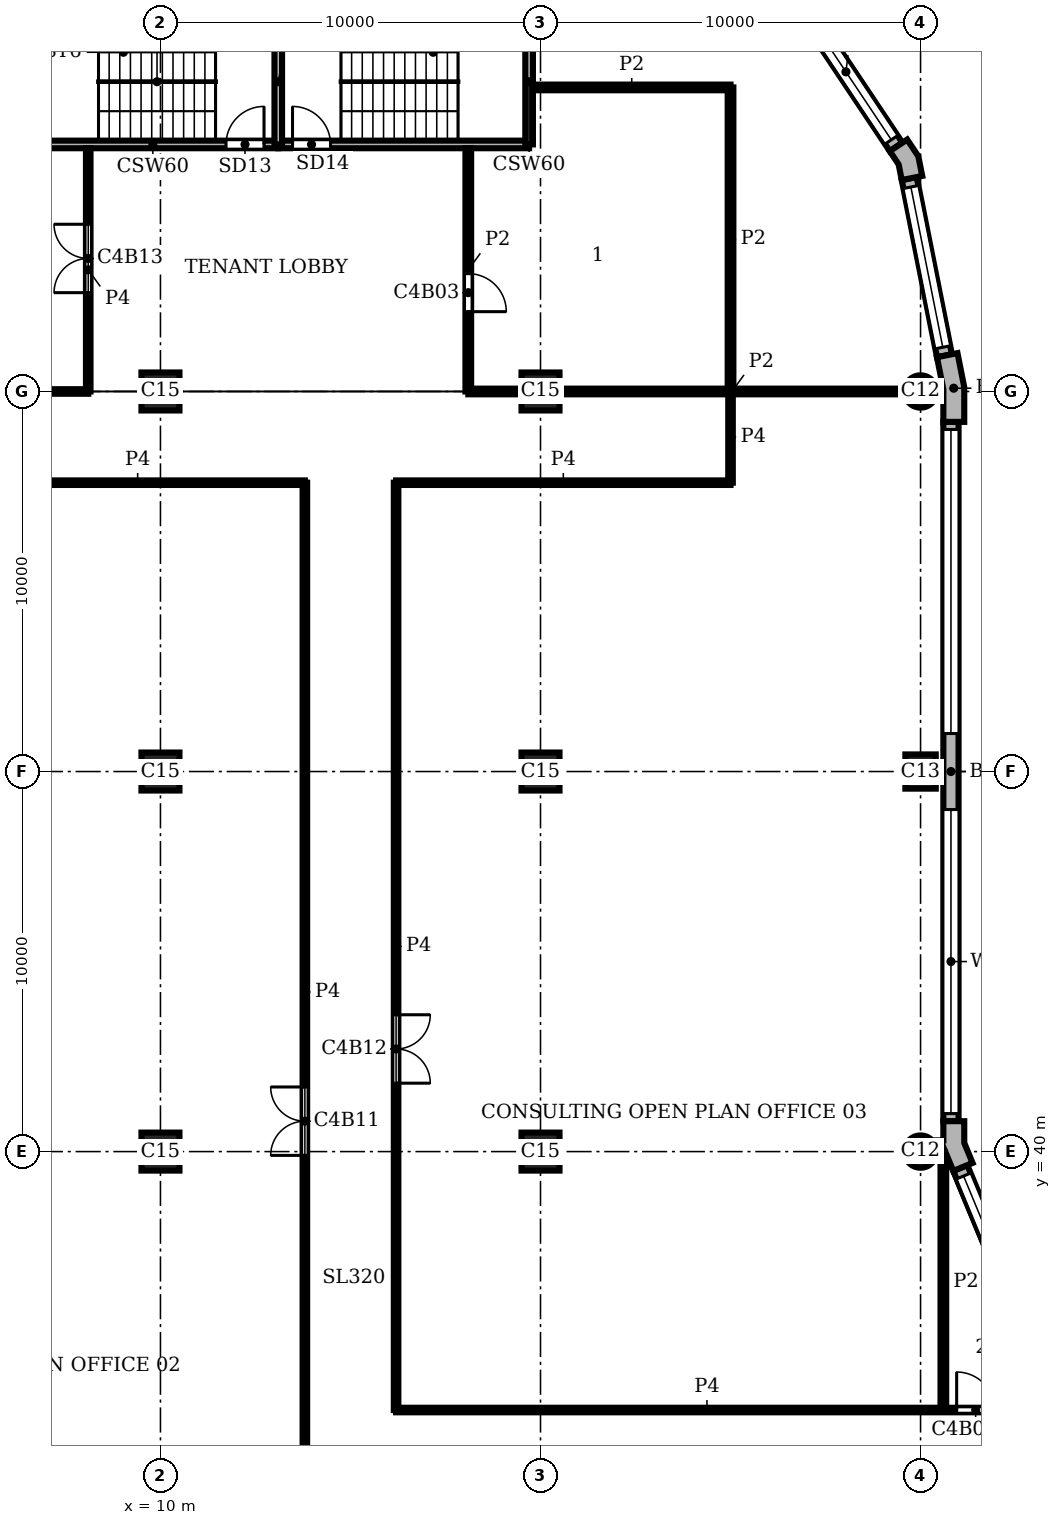
"""IFC4 building model, lengths in metres.
Left out: names, types, materials, properties, quantities, classifications, styles, units other than length and angle.
Written with IfcOpenShell. Run it as: python <this file> out.ifc"""

import sys

from ifc_helpers import new_model, si_unit, direction, frame, frame_2d, origin, origin_2d, place, context, subcontext, project, spatial, polyline, rectangle, circle, outline, extrude, element, fill, save


model = new_model("IFC4")
c1 = context("Model", 3, precision=1e-05, world=origin(), true_north=direction((0.0, 1.0)))
c2 = subcontext(c1, "Body", "Model", "MODEL_VIEW")
j1 = project(units=[si_unit("LENGTHUNIT", "METRE"), si_unit("PLANEANGLEUNIT", "RADIAN")], contexts=[c1])
p1 = place(None, origin())
s1 = spatial("IfcSite", under=j1, at=p1, CompositionType="ELEMENT")
p2 = place(p1, origin())
s2 = spatial("IfcBuilding", under=s1, at=p2, CompositionType="ELEMENT")
p3 = place(p2, frame((0.0, 0.0, 282.6)))
s3 = spatial("IfcBuildingStorey", under=s2, at=p3, CompositionType="ELEMENT", Elevation=282.6)
p4 = place(p3, frame((30.0, 40.0, 0.0), z_axis=(0.0, 0.0, 1.0), x_axis=(1.0, 0.0, 0.0)))
e1 = element("IfcColumn", 1, at=p4, inside=s3, PredefinedType="COLUMN", context=c2, shape_type="SweptSolid", body=[
    extrude(circle(Radius=0.425, at=origin_2d()), origin(), (0.0, 0.0, 1.0), 3.9),
])
p5 = place(p3, frame((30.0, 50.0, 0.0), z_axis=(0.0, 0.0, 1.0), x_axis=(0.0, 1.0, 0.0)))
e2 = element("IfcColumn", 2, at=p5, inside=s3, PredefinedType="COLUMN", context=c2, shape_type="SweptSolid", body=[
    extrude(rectangle(XDim=0.9, YDim=0.8, at=origin_2d()), origin(), (0.0, 0.0, 1.0), 3.9),
])
p6 = place(p3, frame((30.0, 60.0, 0.0), z_axis=(0.0, 0.0, 1.0), x_axis=(1.0, 0.0, 0.0)))
e3 = element("IfcColumn", 3, at=p6, inside=s3, PredefinedType="COLUMN", context=c2, shape_type="SweptSolid", body=[
    extrude(circle(Radius=0.425, at=origin_2d()), origin(), (0.0, 0.0, 1.0), 3.9),
])
for number, where, z_axis, x_axis in (
    (4, (10.0, 40.0, 0.0), (0.0, 0.0, 1.0), (1.0, 0.0, 0.0)),
    (5, (10.0, 50.0, 0.0), (0.0, 0.0, 1.0), (1.0, 0.0, 0.0)),
    (6, (10.0, 60.0, 0.0), (0.0, 0.0, 1.0), (1.0, 0.0, 0.0)),
    (7, (20.0, 40.0, 0.0), (0.0, 0.0, 1.0), (1.0, 0.0, 0.0)),
    (8, (20.0, 50.0, 0.0), (0.0, 0.0, 1.0), (1.0, 0.0, 0.0)),
    (9, (20.0, 60.0, 0.0), (0.0, 0.0, 1.0), (1.0, 0.0, 0.0)),
):
    element("IfcColumn", number, at=place(p3, frame(where, z_axis=z_axis, x_axis=x_axis)), inside=s3, PredefinedType="COLUMN", context=c2, shape_type="SweptSolid", body=[
        extrude(rectangle(XDim=1.0, YDim=1.0, at=origin_2d()), origin(), (0.0, 0.0, 1.0), 3.9),
    ])
p7 = place(p3, origin())
e10 = element("IfcWall", 10, at=p7, inside=s3, PredefinedType="SOLIDWALL", context=c2, shape_type="SweptSolid", body=[
    extrude(outline(polyline([(30.62, 39.995), (30.62, 40.071), (30.861, 39.49), (31.23, 39.644), (31.369, 39.701), (31.15, 40.229), (31.15, 40.8), (31.0, 40.8), (30.6, 40.8), (30.6, 40.295), (30.425, 40.295), (30.425, 39.995), (30.62, 39.995)])), origin(), (0.0, 0.0, 1.0), 3.9),
])
e11 = element("IfcWall", 11, at=p7, inside=s3, PredefinedType="SOLIDWALL", context=c2, shape_type="SweptSolid", body=[
    extrude(outline(polyline([(31.0, 59.2), (31.15, 59.2), (31.15, 60.113), (30.972, 61.009), (30.825, 60.98), (30.432, 60.902), (30.6, 60.059), (30.6, 59.2), (31.0, 59.2)])), origin(), (0.0, 0.0, 1.0), 3.9),
])
e12 = element("IfcWall", 12, at=p7, inside=s3, PredefinedType="SOLIDWALL", context=c2, shape_type="SweptSolid", body=[
    extrude(outline(polyline([(29.897, 65.641), (30.045, 65.67), (29.941, 66.189), (29.648, 66.629), (29.523, 66.545), (29.19, 66.323), (29.423, 65.974), (29.505, 65.563), (29.897, 65.641)])), origin(), (0.0, 0.0, 1.0), 3.9),
])
p8 = place(p3, frame((33.362, 33.974, 0.0), z_axis=(0.0, 0.0, 1.0), x_axis=(-0.382655745237, 0.923891000409, 0.0)))
e13 = element("IfcWall", 13, at=p8, inside=s3, PredefinedType="SOLIDWALL", context=c2, shape_type="SweptSolid", body=[
    extrude(rectangle(XDim=6.053, YDim=0.4, at=frame_2d((3.027, 0.0))), origin(), (0.0, 0.0, 1.0), 3.9),
])
p9 = place(p8, frame((0.227, 0.0, 0.9)))
e14 = element("IfcOpeningElement", 14, at=p9, cuts=e13, PredefinedType="OPENING", context=c2, shape_type="SweptSolid", body=[
    extrude(rectangle(XDim=5.6, YDim=2.35, at=frame_2d((2.8, 1.175))), frame((0.0, 0.21, 0.0), z_axis=(0.0, -1.0, 0.0), x_axis=(1.0, 0.0, 0.0)), (0.0, 0.0, 1.0), 0.42),
])
p10 = place(p3, frame((30.8, 40.8, 0.0), z_axis=(0.0, 0.0, 1.0), x_axis=(0.0, 1.0, 0.0)))
e15 = element("IfcWall", 15, at=p10, inside=s3, PredefinedType="SOLIDWALL", context=c2, shape_type="SweptSolid", body=[
    extrude(rectangle(XDim=18.4, YDim=0.4, at=frame_2d((9.2, 0.0))), origin(), (0.0, 0.0, 1.0), 3.9),
])
p11 = place(p10, frame((0.2, 0.0, 0.9)))
e16 = element("IfcOpeningElement", 16, at=p11, cuts=e15, PredefinedType="OPENING", context=c2, shape_type="SweptSolid", body=[
    extrude(rectangle(XDim=8.0, YDim=2.35, at=frame_2d((4.0, 1.175))), frame((0.0, 0.21, 0.0), z_axis=(0.0, -1.0, 0.0), x_axis=(1.0, 0.0, 0.0)), (0.0, 0.0, 1.0), 0.42),
])
p12 = place(p10, frame((10.2, 0.0, 0.9)))
e17 = element("IfcOpeningElement", 17, at=p12, cuts=e15, PredefinedType="OPENING", context=c2, shape_type="SweptSolid", body=[
    extrude(rectangle(XDim=8.0, YDim=2.35, at=frame_2d((4.0, 1.175))), frame((0.0, 0.21, 0.0), z_axis=(0.0, -1.0, 0.0), x_axis=(1.0, 0.0, 0.0)), (0.0, 0.0, 1.0), 0.42),
])
p13 = place(p3, frame((30.629, 60.941, 0.0), z_axis=(0.0, 0.0, 1.0), x_axis=(-0.195098533057, 0.98078364709, 0.0)))
e18 = element("IfcWall", 18, at=p13, inside=s3, PredefinedType="SOLIDWALL", context=c2, shape_type="SweptSolid", body=[
    extrude(rectangle(XDim=4.753, YDim=0.4, at=frame_2d((2.376, 0.0))), origin(), (0.0, 0.0, 1.0), 3.9),
])
p14 = place(p13, frame((0.226, 0.0, 0.9)))
e19 = element("IfcOpeningElement", 19, at=p14, cuts=e18, PredefinedType="OPENING", context=c2, shape_type="SweptSolid", body=[
    extrude(rectangle(XDim=4.3, YDim=2.35, at=frame_2d((2.15, 1.175))), frame((0.0, 0.21, 0.0), z_axis=(0.0, -1.0, 0.0), x_axis=(1.0, 0.0, 0.0)), (0.0, 0.0, 1.0), 0.42),
])
p15 = place(p3, frame((29.357, 66.434, 0.0), z_axis=(0.0, 0.0, 1.0), x_axis=(-0.555541552266, 0.831488775454, 0.0)))
e20 = element("IfcWall", 20, at=p15, inside=s3, PredefinedType="SOLIDWALL", context=c2, shape_type="SweptSolid", body=[
    extrude(rectangle(XDim=4.753, YDim=0.4, at=frame_2d((2.376, 0.0))), origin(), (0.0, 0.0, 1.0), 3.9),
])
p16 = place(p15, frame((0.226, 0.0, 0.9)))
e21 = element("IfcOpeningElement", 21, at=p16, cuts=e20, PredefinedType="OPENING", context=c2, shape_type="SweptSolid", body=[
    extrude(rectangle(XDim=4.3, YDim=2.35, at=frame_2d((2.15, 1.175))), frame((0.0, 0.21, 0.0), z_axis=(0.0, -1.0, 0.0), x_axis=(1.0, 0.0, 0.0)), (0.0, 0.0, 1.0), 0.42),
])
p17 = place(p3, frame((6.5, 66.5, 0.0), z_axis=(0.0, 0.0, 1.0), x_axis=(1.0, 0.0, 0.0)))
e22 = element("IfcWall", 22, at=p17, inside=s3, PredefinedType="SHEAR", context=c2, shape_type="SweptSolid", body=[
    extrude(rectangle(XDim=6.6, YDim=0.2, at=frame_2d((3.3, 0.0))), origin(), (0.0, 0.0, 1.0), 3.58),
])
p18 = place(p17, frame((5.225, 0.0, 0.0)))
e23 = element("IfcOpeningElement", 23, at=p18, cuts=e22, PredefinedType="OPENING", context=c2, shape_type="SweptSolid", body=[
    extrude(rectangle(XDim=1.0, YDim=2.1, at=frame_2d((0.5, 1.05))), frame((0.0, 0.11, 0.0), z_axis=(0.0, -1.0, 0.0), x_axis=(1.0, 0.0, 0.0)), (0.0, 0.0, 1.0), 0.22),
])
p19 = place(p3, frame((13.1, 66.5, 0.0), z_axis=(0.0, 0.0, 1.0), x_axis=(1.0, 0.0, 0.0)))
e24 = element("IfcWall", 24, at=p19, inside=s3, PredefinedType="SHEAR", context=c2, shape_type="SweptSolid", body=[
    extrude(rectangle(XDim=6.6, YDim=0.2, at=frame_2d((3.3, 0.0))), origin(), (0.0, 0.0, 1.0), 3.58),
])
p20 = place(p19, frame((0.375, 0.0, 0.0)))
e25 = element("IfcOpeningElement", 25, at=p20, cuts=e24, PredefinedType="OPENING", context=c2, shape_type="SweptSolid", body=[
    extrude(rectangle(XDim=1.0, YDim=2.1, at=frame_2d((0.5, 1.05))), frame((0.0, 0.11, 0.0), z_axis=(0.0, -1.0, 0.0), x_axis=(1.0, 0.0, 0.0)), (0.0, 0.0, 1.0), 0.22),
])
for number, where, z_axis, x_axis in (
    (26, (13.1, 66.5, 0.0), (0.0, 0.0, 1.0), (0.0, 1.0, 0.0)),
    (27, (19.7, 66.5, 0.0), (0.0, 0.0, 1.0), (0.0, 1.0, 0.0)),
):
    element("IfcWall", number, at=place(p3, frame(where, z_axis=z_axis, x_axis=x_axis)), inside=s3, PredefinedType="SHEAR", context=c2, shape_type="SweptSolid", body=[
        extrude(rectangle(XDim=3.3, YDim=0.2, at=frame_2d((1.65, 0.0))), origin(), (0.0, 0.0, 1.0), 3.58),
    ])
p21 = place(p3, frame((18.1, 60.0, 0.0), z_axis=(0.0, 0.0, 1.0), x_axis=(0.0, 1.0, 0.0)))
e28 = element("IfcWall", 28, at=p21, inside=s3, PredefinedType="PARTITIONING", context=c2, shape_type="SweptSolid", body=[
    extrude(rectangle(XDim=6.4, YDim=0.15, at=frame_2d((3.2, 0.0))), origin(), (0.0, 0.0, 1.0), 3.58),
])
p22 = place(p21, frame((2.1, 0.0, 0.0)))
e29 = element("IfcOpeningElement", 29, at=p22, cuts=e28, PredefinedType="OPENING", context=c2, shape_type="SweptSolid", body=[
    extrude(rectangle(XDim=1.0, YDim=2.1, at=frame_2d((0.5, 1.05))), frame((0.0, 0.085, 0.0), z_axis=(0.0, -1.0, 0.0), x_axis=(1.0, 0.0, 0.0)), (0.0, 0.0, 1.0), 0.17),
])
p23 = place(p3, frame((25.0, 60.0, 0.0), z_axis=(0.0, 0.0, 1.0), x_axis=(0.0, 1.0, 0.0)))
e30 = element("IfcWall", 30, at=p23, inside=s3, PredefinedType="PARTITIONING", context=c2, shape_type="SweptSolid", body=[
    extrude(rectangle(XDim=8.0, YDim=0.15, at=frame_2d((4.0, 0.0))), origin(), (0.0, 0.0, 1.0), 3.58),
])
p24 = place(p3, frame((30.6, 33.2, 0.0), z_axis=(0.0, 0.0, 1.0), x_axis=(0.0, 1.0, 0.0)))
e31 = element("IfcWall", 31, at=p24, inside=s3, PredefinedType="PARTITIONING", context=c2, shape_type="SweptSolid", body=[
    extrude(rectangle(XDim=6.738, YDim=0.15, at=frame_2d((3.369, 0.0))), origin(), (0.0, 0.0, 1.0), 3.58),
])
p25 = place(p3, frame((18.1, 60.0, 0.0), z_axis=(0.0, 0.0, 1.0), x_axis=(1.0, 0.0, 0.0)))
e32 = element("IfcWall", 32, at=p25, inside=s3, PredefinedType="PARTITIONING", context=c2, shape_type="SweptSolid", body=[
    extrude(rectangle(XDim=1.4, YDim=0.15, at=frame_2d((0.7, 0.0))), origin(), (0.0, 0.0, 1.0), 3.58),
])
p26 = place(p3, frame((20.5, 60.0, 0.0), z_axis=(0.0, 0.0, 1.0), x_axis=(1.0, 0.0, 0.0)))
e33 = element("IfcWall", 33, at=p26, inside=s3, PredefinedType="PARTITIONING", context=c2, shape_type="SweptSolid", body=[
    extrude(rectangle(XDim=9.075, YDim=0.15, at=frame_2d((4.538, 0.0))), origin(), (0.0, 0.0, 1.0), 3.58),
])
p27 = place(p3, frame((19.8, 68.0, 0.0), z_axis=(0.0, 0.0, 1.0), x_axis=(1.0, 0.0, 0.0)))
e34 = element("IfcWall", 34, at=p27, inside=s3, PredefinedType="PARTITIONING", context=c2, shape_type="SweptSolid", body=[
    extrude(rectangle(XDim=5.2, YDim=0.15, at=frame_2d((2.6, 0.0))), origin(), (0.0, 0.0, 1.0), 3.58),
])
p28 = place(p3, frame((8.1, 60.0, 0.0), z_axis=(0.0, 0.0, 1.0), x_axis=(0.0, 1.0, 0.0)))
e35 = element("IfcWall", 35, at=p28, inside=s3, PredefinedType="PARTITIONING", context=c2, shape_type="SweptSolid", body=[
    extrude(rectangle(XDim=6.4, YDim=0.12, at=frame_2d((3.2, 0.0))), origin(), (0.0, 0.0, 1.0), 3.58),
])
p29 = place(p28, frame((2.6, 0.0, 0.0)))
e36 = element("IfcOpeningElement", 36, at=p29, cuts=e35, PredefinedType="OPENING", context=c2, shape_type="SweptSolid", body=[
    extrude(rectangle(XDim=1.8, YDim=2.1, at=frame_2d((0.9, 1.05))), frame((0.0, 0.07, 0.0), z_axis=(0.0, -1.0, 0.0), x_axis=(1.0, 0.0, 0.0)), (0.0, 0.0, 1.0), 0.14),
])
p30 = place(p3, frame((13.8, 30.8, 0.0), z_axis=(0.0, 0.0, 1.0), x_axis=(0.0, 1.0, 0.0)))
e37 = element("IfcWall", 37, at=p30, inside=s3, PredefinedType="PARTITIONING", context=c2, shape_type="SweptSolid", body=[
    extrude(rectangle(XDim=26.8, YDim=0.12, at=frame_2d((13.4, 0.0))), origin(), (0.0, 0.0, 1.0), 3.58),
])
p31 = place(p30, frame((9.1, 0.0, 0.0)))
e38 = element("IfcOpeningElement", 38, at=p31, cuts=e37, PredefinedType="OPENING", context=c2, shape_type="SweptSolid", body=[
    extrude(rectangle(XDim=1.8, YDim=2.1, at=frame_2d((0.9, 1.05))), frame((0.0, 0.07, 0.0), z_axis=(0.0, -1.0, 0.0), x_axis=(1.0, 0.0, 0.0)), (0.0, 0.0, 1.0), 0.14),
])
p32 = place(p3, frame((16.2, 33.2, 0.0), z_axis=(0.0, 0.0, 1.0), x_axis=(0.0, 1.0, 0.0)))
e39 = element("IfcWall", 39, at=p32, inside=s3, PredefinedType="PARTITIONING", context=c2, shape_type="SweptSolid", body=[
    extrude(rectangle(XDim=24.4, YDim=0.12, at=frame_2d((12.2, 0.0))), origin(), (0.0, 0.0, 1.0), 3.58),
])
p33 = place(p32, frame((8.6, 0.0, 0.0)))
e40 = element("IfcOpeningElement", 40, at=p33, cuts=e39, PredefinedType="OPENING", context=c2, shape_type="SweptSolid", body=[
    extrude(rectangle(XDim=1.8, YDim=2.1, at=frame_2d((0.9, 1.05))), frame((0.0, 0.07, 0.0), z_axis=(0.0, -1.0, 0.0), x_axis=(1.0, 0.0, 0.0)), (0.0, 0.0, 1.0), 0.14),
])
p34 = place(p3, frame((25.0, 57.6, 0.0), z_axis=(0.0, 0.0, 1.0), x_axis=(0.0, 1.0, 0.0)))
e41 = element("IfcWall", 41, at=p34, inside=s3, PredefinedType="PARTITIONING", context=c2, shape_type="SweptSolid", body=[
    extrude(rectangle(XDim=2.4, YDim=0.12, at=frame_2d((1.2, 0.0))), origin(), (0.0, 0.0, 1.0), 3.58),
])
p35 = place(p3, frame((16.2, 33.2, 0.0), z_axis=(0.0, 0.0, 1.0), x_axis=(1.0, 0.0, 0.0)))
e42 = element("IfcWall", 42, at=p35, inside=s3, PredefinedType="PARTITIONING", context=c2, shape_type="SweptSolid", body=[
    extrude(rectangle(XDim=16.36, YDim=0.12, at=frame_2d((8.18, 0.0))), origin(), (0.0, 0.0, 1.0), 3.58),
])
p36 = place(p35, frame((14.75, 0.0, 0.0)))
e43 = element("IfcOpeningElement", 43, at=p36, cuts=e42, PredefinedType="OPENING", context=c2, shape_type="SweptSolid", body=[
    extrude(rectangle(XDim=1.0, YDim=2.1, at=frame_2d((0.5, 1.05))), frame((0.0, 0.07, 0.0), z_axis=(0.0, -1.0, 0.0), x_axis=(1.0, 0.0, 0.0)), (0.0, 0.0, 1.0), 0.14),
])
for number, where, z_axis, x_axis in (
    (44, (5.0, 57.6, 0.0), (0.0, 0.0, 1.0), (1.0, 0.0, 0.0)),
    (45, (16.2, 57.6, 0.0), (0.0, 0.0, 1.0), (1.0, 0.0, 0.0)),
):
    element("IfcWall", number, at=place(p3, frame(where, z_axis=z_axis, x_axis=x_axis)), inside=s3, PredefinedType="PARTITIONING", context=c2, shape_type="SweptSolid", body=[
        extrude(rectangle(XDim=8.8, YDim=0.12, at=frame_2d((4.4, 0.0))), origin(), (0.0, 0.0, 1.0), 3.58),
    ])
p37 = place(p3, frame((5.0, 60.0, 0.0), z_axis=(0.0, 0.0, 1.0), x_axis=(1.0, 0.0, 0.0)))
e46 = element("IfcWall", 46, at=p37, inside=s3, PredefinedType="PARTITIONING", context=c2, shape_type="SweptSolid", body=[
    extrude(rectangle(XDim=3.1, YDim=0.12, at=frame_2d((1.55, 0.0))), origin(), (0.0, 0.0, 1.0), 3.58),
])
p38 = place(p9, origin())
e47 = element("IfcWindow", 47, at=p38, inside=s3, PartitioningType="SINGLE_PANEL", PredefinedType="WINDOW", context=c2, shape_type="SweptSolid", body=[
    extrude(rectangle(XDim=5.6, YDim=2.35, at=frame_2d((2.8, 1.175))), frame((0.0, 0.16, 0.0), z_axis=(0.0, -1.0, 0.0), x_axis=(1.0, 0.0, 0.0)), (0.0, 0.0, 1.0), 0.06),
])
fill(e14, e47)
p39 = place(p11, origin())
e48 = element("IfcWindow", 48, at=p39, inside=s3, PartitioningType="SINGLE_PANEL", PredefinedType="WINDOW", context=c2, shape_type="SweptSolid", body=[
    extrude(rectangle(XDim=8.0, YDim=2.35, at=frame_2d((4.0, 1.175))), frame((0.0, 0.16, 0.0), z_axis=(0.0, -1.0, 0.0), x_axis=(1.0, 0.0, 0.0)), (0.0, 0.0, 1.0), 0.06),
])
fill(e16, e48)
p40 = place(p12, origin())
e49 = element("IfcWindow", 49, at=p40, inside=s3, PartitioningType="SINGLE_PANEL", PredefinedType="WINDOW", context=c2, shape_type="SweptSolid", body=[
    extrude(rectangle(XDim=8.0, YDim=2.35, at=frame_2d((4.0, 1.175))), frame((0.0, 0.16, 0.0), z_axis=(0.0, -1.0, 0.0), x_axis=(1.0, 0.0, 0.0)), (0.0, 0.0, 1.0), 0.06),
])
fill(e17, e49)
p41 = place(p14, origin())
e50 = element("IfcWindow", 50, at=p41, inside=s3, PartitioningType="SINGLE_PANEL", PredefinedType="WINDOW", context=c2, shape_type="SweptSolid", body=[
    extrude(rectangle(XDim=4.3, YDim=2.35, at=frame_2d((2.15, 1.175))), frame((0.0, 0.16, 0.0), z_axis=(0.0, -1.0, 0.0), x_axis=(1.0, 0.0, 0.0)), (0.0, 0.0, 1.0), 0.06),
])
fill(e19, e50)
p42 = place(p16, origin())
e51 = element("IfcWindow", 51, at=p42, inside=s3, PartitioningType="SINGLE_PANEL", PredefinedType="WINDOW", context=c2, shape_type="SweptSolid", body=[
    extrude(rectangle(XDim=4.3, YDim=2.35, at=frame_2d((2.15, 1.175))), frame((0.0, 0.16, 0.0), z_axis=(0.0, -1.0, 0.0), x_axis=(1.0, 0.0, 0.0)), (0.0, 0.0, 1.0), 0.06),
])
fill(e21, e51)
p43 = place(p18, origin())
e52 = element("IfcDoor", 52, at=p43, inside=s3, OperationType="SINGLE_SWING_RIGHT", PredefinedType="DOOR", context=c2, shape_type="SweptSolid", body=[
    extrude(rectangle(XDim=1.0, YDim=2.1, at=frame_2d((0.5, 1.05))), frame((0.0, 0.025, 0.0), z_axis=(0.0, -1.0, 0.0), x_axis=(1.0, 0.0, 0.0)), (0.0, 0.0, 1.0), 0.05),
])
fill(e23, e52)
p44 = place(p20, origin())
e53 = element("IfcDoor", 53, at=p44, inside=s3, OperationType="SINGLE_SWING_LEFT", PredefinedType="DOOR", context=c2, shape_type="SweptSolid", body=[
    extrude(rectangle(XDim=1.0, YDim=2.1, at=frame_2d((0.5, 1.05))), frame((0.0, 0.025, 0.0), z_axis=(0.0, -1.0, 0.0), x_axis=(1.0, 0.0, 0.0)), (0.0, 0.0, 1.0), 0.05),
])
fill(e25, e53)
p45 = place(p22, frame((1.0, 0.0, 0.0), z_axis=(0.0, 0.0, 1.0), x_axis=(-1.0, 0.0, 0.0)))
e54 = element("IfcDoor", 54, at=p45, inside=s3, OperationType="SINGLE_SWING_RIGHT", PredefinedType="DOOR", context=c2, shape_type="SweptSolid", body=[
    extrude(rectangle(XDim=1.0, YDim=2.1, at=frame_2d((0.5, 1.05))), frame((0.0, 0.025, 0.0), z_axis=(0.0, -1.0, 0.0), x_axis=(1.0, 0.0, 0.0)), (0.0, 0.0, 1.0), 0.05),
])
fill(e29, e54)
p46 = place(p36, origin())
e55 = element("IfcDoor", 55, at=p46, inside=s3, OperationType="SINGLE_SWING_LEFT", PredefinedType="DOOR", context=c2, shape_type="SweptSolid", body=[
    extrude(rectangle(XDim=1.0, YDim=2.1, at=frame_2d((0.5, 1.05))), frame((0.0, 0.025, 0.0), z_axis=(0.0, -1.0, 0.0), x_axis=(1.0, 0.0, 0.0)), (0.0, 0.0, 1.0), 0.05),
])
fill(e43, e55)
p47 = place(p31, origin())
e56 = element("IfcDoor", 56, at=p47, inside=s3, OperationType="DOUBLE_DOOR_SINGLE_SWING", PredefinedType="DOOR", context=c2, shape_type="SweptSolid", body=[
    extrude(rectangle(XDim=1.8, YDim=2.1, at=frame_2d((0.9, 1.05))), frame((0.0, 0.025, 0.0), z_axis=(0.0, -1.0, 0.0), x_axis=(1.0, 0.0, 0.0)), (0.0, 0.0, 1.0), 0.05),
])
fill(e38, e56)
p48 = place(p33, frame((1.8, 0.0, 0.0), z_axis=(0.0, 0.0, 1.0), x_axis=(-1.0, 0.0, 0.0)))
e57 = element("IfcDoor", 57, at=p48, inside=s3, OperationType="DOUBLE_DOOR_SINGLE_SWING", PredefinedType="DOOR", context=c2, shape_type="SweptSolid", body=[
    extrude(rectangle(XDim=1.8, YDim=2.1, at=frame_2d((0.9, 1.05))), frame((0.0, 0.025, 0.0), z_axis=(0.0, -1.0, 0.0), x_axis=(1.0, 0.0, 0.0)), (0.0, 0.0, 1.0), 0.05),
])
fill(e40, e57)
p49 = place(p29, origin())
e58 = element("IfcDoor", 58, at=p49, inside=s3, OperationType="DOUBLE_DOOR_SINGLE_SWING", PredefinedType="DOOR", context=c2, shape_type="SweptSolid", body=[
    extrude(rectangle(XDim=1.8, YDim=2.1, at=frame_2d((0.9, 1.05))), frame((0.0, 0.025, 0.0), z_axis=(0.0, -1.0, 0.0), x_axis=(1.0, 0.0, 0.0)), (0.0, 0.0, 1.0), 0.05),
])
fill(e36, e58)
save(model, sys.argv[1])
